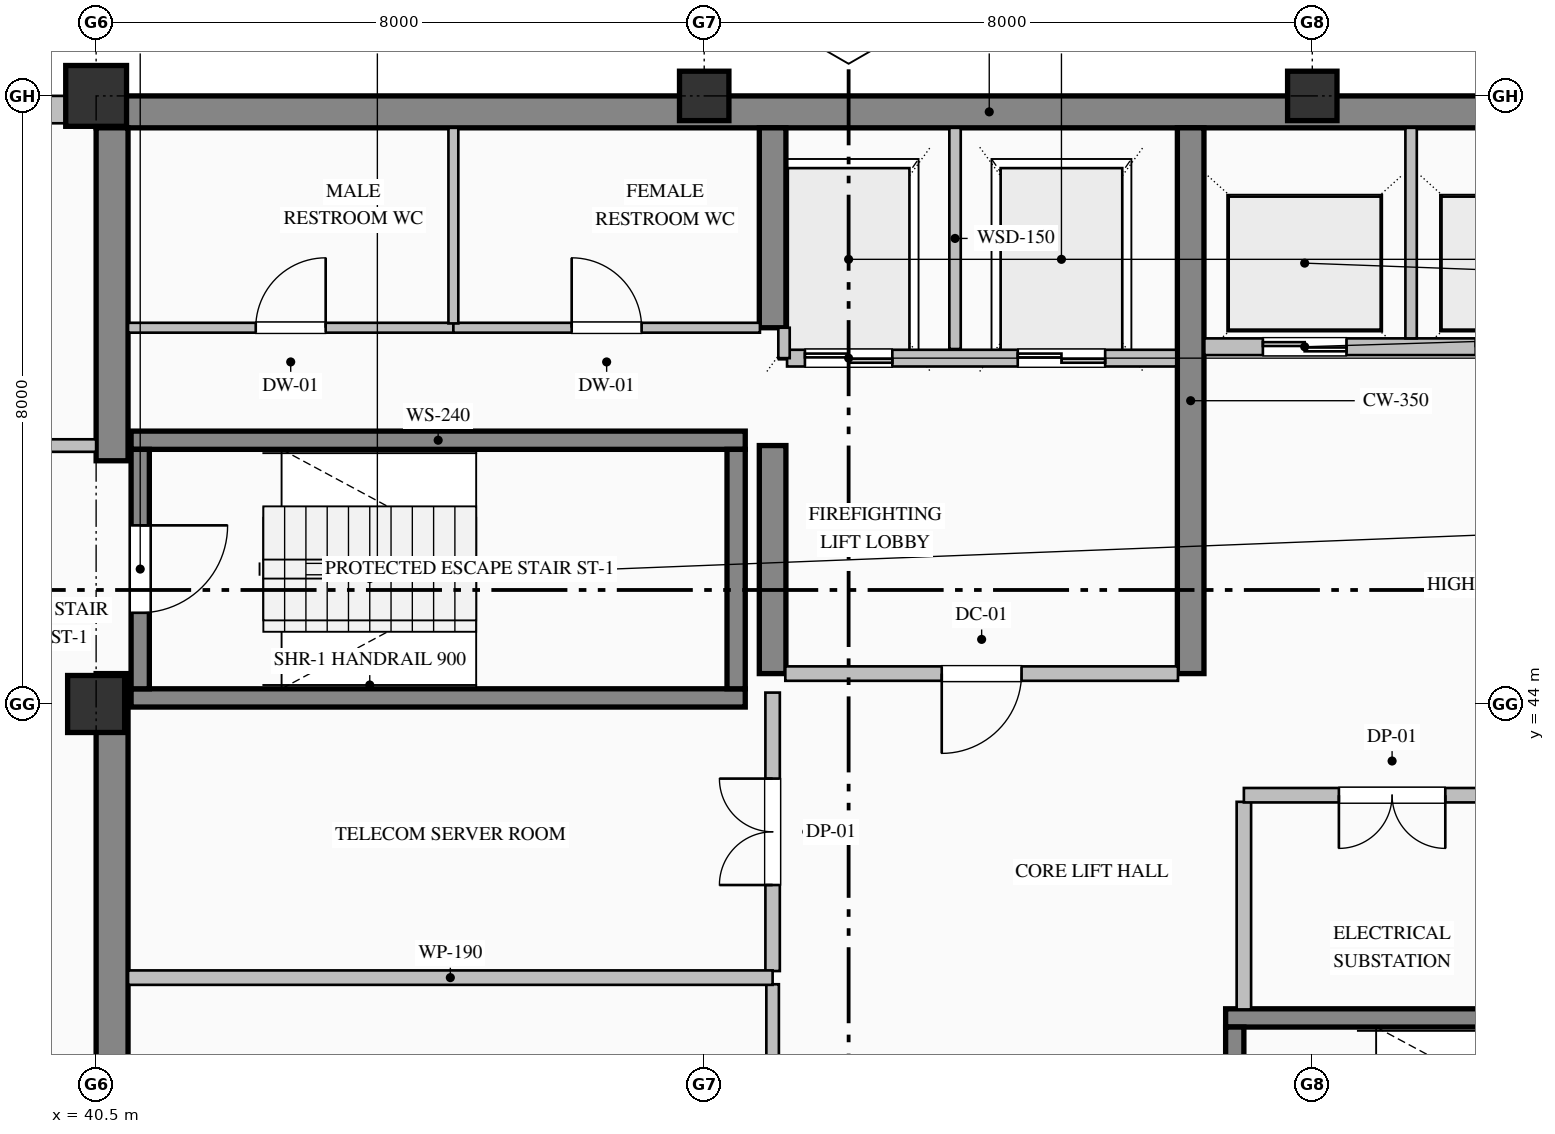
"""IFC4 building model, lengths in metres.
Left out: names, types, materials, properties, quantities, classifications, styles, units other than length and angle.
Written with IfcOpenShell. Run it as: python <this file> out.ifc"""

import sys

from ifc_helpers import new_model, si_unit, direction, frame, frame_2d, origin, origin_2d, place, context, subcontext, project, spatial, rectangle, hollow_rectangle, extrude, element, fill, save


model = new_model("IFC4")
c1 = context("Model", 3, precision=1e-05, world=origin(), true_north=direction((0.0, 1.0)))
c2 = subcontext(c1, "Body", "Model", "MODEL_VIEW")
j1 = project(units=[si_unit("LENGTHUNIT", "METRE"), si_unit("PLANEANGLEUNIT", "RADIAN")], contexts=[c1])
p1 = place(None, origin())
s1 = spatial("IfcSite", under=j1, at=p1, CompositionType="ELEMENT")
p2 = place(p1, origin())
s2 = spatial("IfcBuilding", under=s1, at=p2, CompositionType="ELEMENT")
p3 = place(p2, frame((0.0, 0.0, 299.2)))
s3 = spatial("IfcBuildingStorey", under=s2, at=p3, CompositionType="ELEMENT", Elevation=299.2)
p4 = place(p3, frame((40.5, 51.79, 0.0), z_axis=(0.0, 0.0, 1.0), x_axis=(1.0, 0.0, 0.0)))
e1 = element("IfcWall", 1, at=p4, inside=s3, PredefinedType="SHEAR", context=c2, shape_type="SweptSolid", body=[
    extrude(rectangle(XDim=23.5, YDim=0.42, at=frame_2d((11.75, 0.0))), origin(), (0.0, 0.0, 1.0), 3.785),
])
p5 = place(p3, frame((40.71, 36.42, 0.0), z_axis=(0.0, 0.0, 1.0), x_axis=(0.0, 1.0, 0.0)))
e2 = element("IfcWall", 2, at=p5, inside=s3, PredefinedType="SHEAR", context=c2, shape_type="SweptSolid", body=[
    extrude(rectangle(XDim=7.98, YDim=0.42, at=frame_2d((3.99, 0.0))), origin(), (0.0, 0.0, 1.0), 3.785),
])
p6 = place(p3, frame((40.71, 47.2, 0.0), z_axis=(0.0, 0.0, 1.0), x_axis=(0.0, 1.0, 0.0)))
e3 = element("IfcWall", 3, at=p6, inside=s3, PredefinedType="SHEAR", context=c2, shape_type="SweptSolid", body=[
    extrude(rectangle(XDim=4.38, YDim=0.42, at=frame_2d((2.19, 0.0))), origin(), (0.0, 0.0, 1.0), 3.785),
])
p7 = place(p3, frame((49.4, 44.4, 0.0), z_axis=(0.0, 0.0, 1.0), x_axis=(0.0, 1.0, 0.0)))
e4 = element("IfcWall", 4, at=p7, inside=s3, PredefinedType="SHEAR", context=c2, shape_type="SweptSolid", body=[
    extrude(rectangle(XDim=3.0, YDim=0.35, at=frame_2d((1.5, 0.0))), origin(), (0.0, 0.0, 1.0), 3.785),
])
p8 = place(p3, frame((49.4, 48.95, 0.0), z_axis=(0.0, 0.0, 1.0), x_axis=(0.0, 1.0, 0.0)))
e5 = element("IfcWall", 5, at=p8, inside=s3, PredefinedType="SHEAR", context=c2, shape_type="SweptSolid", body=[
    extrude(rectangle(XDim=2.63, YDim=0.35, at=frame_2d((1.315, 0.0))), origin(), (0.0, 0.0, 1.0), 3.785),
])
p9 = place(p3, frame((54.9, 44.4, 0.0), z_axis=(0.0, 0.0, 1.0), x_axis=(0.0, 1.0, 0.0)))
e6 = element("IfcWall", 6, at=p9, inside=s3, PredefinedType="SHEAR", context=c2, shape_type="SweptSolid", body=[
    extrude(rectangle(XDim=7.18, YDim=0.35, at=frame_2d((3.59, 0.0))), origin(), (0.0, 0.0, 1.0), 3.785),
])
p10 = place(p3, frame((40.5, 44.0, 0.0), z_axis=(0.0, 0.0, 1.0), x_axis=(1.0, 0.0, 0.0)))
e7 = element("IfcColumn", 7, at=p10, inside=s3, PredefinedType="COLUMN", context=c2, shape_type="SweptSolid", body=[
    extrude(rectangle(XDim=0.75, YDim=0.75, at=origin_2d()), origin(), (0.0, 0.0, 1.0), 4.0),
])
p11 = place(p3, frame((40.5, 52.0, 0.0), z_axis=(0.0, 0.0, 1.0), x_axis=(1.0, 0.0, 0.0)))
e8 = element("IfcColumn", 8, at=p11, inside=s3, PredefinedType="COLUMN", context=c2, shape_type="SweptSolid", body=[
    extrude(hollow_rectangle(XDim=0.8, YDim=0.8, WallThickness=0.032, at=origin_2d()), origin(), (0.0, 0.0, 1.0), 4.0),
])
for number, where, z_axis, x_axis in (
    (9, (48.5, 52.0, 0.0), (0.0, 0.0, 1.0), (1.0, 0.0, 0.0)),
    (10, (56.5, 52.0, 0.0), (0.0, 0.0, 1.0), (1.0, 0.0, 0.0)),
):
    element("IfcColumn", number, at=place(p3, frame(where, z_axis=z_axis, x_axis=x_axis)), inside=s3, PredefinedType="COLUMN", context=c2, shape_type="SweptSolid", body=[
        extrude(hollow_rectangle(XDim=0.65, YDim=0.65, WallThickness=0.028, at=origin_2d()), origin(), (0.0, 0.0, 1.0), 4.0),
    ])
p12 = place(p3, frame((20.5, 51.82, 0.0), z_axis=(0.0, 0.0, 1.0), x_axis=(1.0, 0.0, 0.0)))
e11 = element("IfcWall", 11, at=p12, inside=s3, PredefinedType="SOLIDWALL", context=c2, shape_type="SweptSolid", body=[
    extrude(rectangle(XDim=20.02, YDim=0.36, at=frame_2d((10.01, 0.0))), origin(), (0.0, 0.0, 1.0), 3.335),
])
p13 = place(p12, frame((6.725, 0.0, 0.9)))
e12 = element("IfcOpeningElement", 12, at=p13, cuts=e11, PredefinedType="OPENING", context=c2, shape_type="SweptSolid", body=[
    extrude(rectangle(XDim=0.95, YDim=1.85, at=frame_2d((0.475, 0.925))), frame((0.0, 0.19, 0.0), z_axis=(0.0, -1.0, 0.0), x_axis=(1.0, 0.0, 0.0)), (0.0, 0.0, 1.0), 0.38),
])
for number, where, z_axis, x_axis in (
    (13, (40.96, 47.47, 0.0), (0.0, 0.0, 1.0), (1.0, 0.0, 0.0)),
    (14, (49.04, 44.08, 0.0), (0.0, 0.0, 1.0), (-1.0, 0.0, 0.0)),
):
    element("IfcWall", number, at=place(p3, frame(where, z_axis=z_axis, x_axis=x_axis)), inside=s3, PredefinedType="SOLIDWALL", context=c2, shape_type="SweptSolid", body=[
        extrude(rectangle(XDim=8.08, YDim=0.24, at=frame_2d((4.04, 0.0))), origin(), (0.0, 0.0, 1.0), 4.0),
    ])
p14 = place(p3, frame((41.08, 47.35, 0.0), z_axis=(0.0, 0.0, 1.0), x_axis=(0.0, -1.0, 0.0)))
e15 = element("IfcWall", 15, at=p14, inside=s3, PredefinedType="SOLIDWALL", context=c2, shape_type="SweptSolid", body=[
    extrude(rectangle(XDim=3.15, YDim=0.24, at=frame_2d((1.575, 0.0))), origin(), (0.0, 0.0, 1.0), 4.0),
])
p15 = place(p14, frame((1.0, 0.0, 0.0)))
e16 = element("IfcOpeningElement", 16, at=p15, cuts=e15, PredefinedType="OPENING", context=c2, shape_type="SweptSolid", body=[
    extrude(rectangle(XDim=1.15, YDim=2.2, at=frame_2d((0.575, 1.1))), frame((0.0, 0.13, 0.0), z_axis=(0.0, -1.0, 0.0), x_axis=(1.0, 0.0, 0.0)), (0.0, 0.0, 1.0), 0.26),
])
p16 = place(p3, frame((48.92, 44.2, 0.0), z_axis=(0.0, 0.0, 1.0), x_axis=(0.0, 1.0, 0.0)))
e17 = element("IfcWall", 17, at=p16, inside=s3, PredefinedType="SOLIDWALL", context=c2, shape_type="SweptSolid", body=[
    extrude(rectangle(XDim=3.15, YDim=0.24, at=frame_2d((1.575, 0.0))), origin(), (0.0, 0.0, 1.0), 4.0),
])
p17 = place(p3, frame((55.36, 39.87, 0.0), z_axis=(0.0, 0.0, 1.0), x_axis=(1.0, 0.0, 0.0)))
e18 = element("IfcWall", 18, at=p17, inside=s3, PredefinedType="SOLIDWALL", context=c2, shape_type="SweptSolid", body=[
    extrude(rectangle(XDim=8.08, YDim=0.24, at=frame_2d((4.04, 0.0))), origin(), (0.0, 0.0, 1.0), 4.0),
])
p18 = place(p3, frame((55.48, 39.75, 0.0), z_axis=(0.0, 0.0, 1.0), x_axis=(0.0, -1.0, 0.0)))
e19 = element("IfcWall", 19, at=p18, inside=s3, PredefinedType="SOLIDWALL", context=c2, shape_type="SweptSolid", body=[
    extrude(rectangle(XDim=3.15, YDim=0.24, at=frame_2d((1.575, 0.0))), origin(), (0.0, 0.0, 1.0), 4.0),
])
p19 = place(p18, frame((1.0, 0.0, 0.0)))
e20 = element("IfcOpeningElement", 20, at=p19, cuts=e19, PredefinedType="OPENING", context=c2, shape_type="SweptSolid", body=[
    extrude(rectangle(XDim=1.15, YDim=2.2, at=frame_2d((0.575, 1.1))), frame((0.0, 0.13, 0.0), z_axis=(0.0, -1.0, 0.0), x_axis=(1.0, 0.0, 0.0)), (0.0, 0.0, 1.0), 0.26),
])
p20 = place(p3, frame((54.71, 48.55, 0.0), z_axis=(0.0, 0.0, 1.0), x_axis=(-1.0, 0.0, 0.0)))
e21 = element("IfcWall", 21, at=p20, inside=s3, PredefinedType="PARTITIONING", context=c2, shape_type="SweptSolid", body=[
    extrude(rectangle(XDim=5.12, YDim=0.22, at=frame_2d((2.56, 0.0))), origin(), (0.0, 0.0, 1.0), 3.785),
])
p21 = place(p20, frame((3.735, 0.0, 0.0)))
e22 = element("IfcOpeningElement", 22, at=p21, cuts=e21, PredefinedType="OPENING", context=c2, shape_type="SweptSolid", body=[
    extrude(rectangle(XDim=1.15, YDim=2.2, at=frame_2d((0.575, 1.1))), frame((0.0, 0.12, 0.0), z_axis=(0.0, -1.0, 0.0), x_axis=(1.0, 0.0, 0.0)), (0.0, 0.0, 1.0), 0.24),
])
p22 = place(p20, frame((0.935, 0.0, 0.0)))
e23 = element("IfcOpeningElement", 23, at=p22, cuts=e21, PredefinedType="OPENING", context=c2, shape_type="SweptSolid", body=[
    extrude(rectangle(XDim=1.15, YDim=2.2, at=frame_2d((0.575, 1.1))), frame((0.0, 0.12, 0.0), z_axis=(0.0, -1.0, 0.0), x_axis=(1.0, 0.0, 0.0)), (0.0, 0.0, 1.0), 0.24),
])
p23 = place(p3, frame((51.8, 48.67, 0.0), z_axis=(0.0, 0.0, 1.0), x_axis=(0.0, 1.0, 0.0)))
e24 = element("IfcWall", 24, at=p23, inside=s3, PredefinedType="PARTITIONING", context=c2, shape_type="SweptSolid", body=[
    extrude(rectangle(XDim=2.91, YDim=0.15, at=frame_2d((1.455, 0.0))), origin(), (0.0, 0.0, 1.0), 3.785),
])
p24 = place(p3, frame((49.55, 48.55, 0.0), z_axis=(0.0, 0.0, 1.0), x_axis=(0.0, 1.0, 0.0)))
e25 = element("IfcWall", 25, at=p24, inside=s3, PredefinedType="PARTITIONING", context=c2, shape_type="SweptSolid", body=[
    extrude(rectangle(XDim=0.4, YDim=0.15, at=frame_2d((0.2, 0.0))), origin(), (0.0, 0.0, 1.0), 3.785),
])
p25 = place(p3, frame((63.32, 48.7, 0.0), z_axis=(0.0, 0.0, 1.0), x_axis=(-1.0, 0.0, 0.0)))
e26 = element("IfcWall", 26, at=p25, inside=s3, PredefinedType="PARTITIONING", context=c2, shape_type="SweptSolid", body=[
    extrude(rectangle(XDim=8.24, YDim=0.22, at=frame_2d((4.12, 0.0))), origin(), (0.0, 0.0, 1.0), 3.785),
])
p26 = place(p25, frame((6.37, 0.0, 0.0)))
e27 = element("IfcOpeningElement", 27, at=p26, cuts=e26, PredefinedType="OPENING", context=c2, shape_type="SweptSolid", body=[
    extrude(rectangle(XDim=1.1, YDim=2.2, at=frame_2d((0.55, 1.1))), frame((0.0, 0.12, 0.0), z_axis=(0.0, -1.0, 0.0), x_axis=(1.0, 0.0, 0.0)), (0.0, 0.0, 1.0), 0.24),
])
p27 = place(p25, frame((3.57, 0.0, 0.0)))
e28 = element("IfcOpeningElement", 28, at=p27, cuts=e26, PredefinedType="OPENING", context=c2, shape_type="SweptSolid", body=[
    extrude(rectangle(XDim=1.1, YDim=2.2, at=frame_2d((0.55, 1.1))), frame((0.0, 0.12, 0.0), z_axis=(0.0, -1.0, 0.0), x_axis=(1.0, 0.0, 0.0)), (0.0, 0.0, 1.0), 0.24),
])
p28 = place(p25, frame((0.77, 0.0, 0.0)))
e29 = element("IfcOpeningElement", 29, at=p28, cuts=e26, PredefinedType="OPENING", context=c2, shape_type="SweptSolid", body=[
    extrude(rectangle(XDim=1.1, YDim=2.2, at=frame_2d((0.55, 1.1))), frame((0.0, 0.12, 0.0), z_axis=(0.0, -1.0, 0.0), x_axis=(1.0, 0.0, 0.0)), (0.0, 0.0, 1.0), 0.24),
])
p29 = place(p3, frame((57.8, 48.81, 0.0), z_axis=(0.0, 0.0, 1.0), x_axis=(0.0, 1.0, 0.0)))
e30 = element("IfcWall", 30, at=p29, inside=s3, PredefinedType="PARTITIONING", context=c2, shape_type="SweptSolid", body=[
    extrude(rectangle(XDim=2.77, YDim=0.15, at=frame_2d((1.385, 0.0))), origin(), (0.0, 0.0, 1.0), 3.785),
])
p30 = place(p3, frame((37.8, 47.4, 0.0), z_axis=(0.0, 0.0, 1.0), x_axis=(1.0, 0.0, 0.0)))
e31 = element("IfcWall", 31, at=p30, inside=s3, PredefinedType="PARTITIONING", context=c2, shape_type="SweptSolid", body=[
    extrude(rectangle(XDim=2.7, YDim=0.165, at=frame_2d((1.35, 0.0))), origin(), (0.0, 0.0, 1.0), 3.785),
])
p31 = place(p30, frame((0.825, 0.0, 0.0)))
e32 = element("IfcOpeningElement", 32, at=p31, cuts=e31, PredefinedType="OPENING", context=c2, shape_type="SweptSolid", body=[
    extrude(rectangle(XDim=1.05, YDim=2.15, at=frame_2d((0.525, 1.075))), frame((0.0, 0.093, 0.0), z_axis=(0.0, -1.0, 0.0), x_axis=(1.0, 0.0, 0.0)), (0.0, 0.0, 1.0), 0.185),
])
p32 = place(p3, frame((40.92, 48.95, 0.0), z_axis=(0.0, 0.0, 1.0), x_axis=(1.0, 0.0, 0.0)))
e33 = element("IfcWall", 33, at=p32, inside=s3, PredefinedType="PARTITIONING", context=c2, shape_type="SweptSolid", body=[
    extrude(rectangle(XDim=4.28, YDim=0.13, at=frame_2d((2.14, 0.0))), origin(), (0.0, 0.0, 1.0), 3.785),
])
p33 = place(p32, frame((1.68, 0.0, 0.0)))
e34 = element("IfcOpeningElement", 34, at=p33, cuts=e33, PredefinedType="OPENING", context=c2, shape_type="SweptSolid", body=[
    extrude(rectangle(XDim=0.92, YDim=2.15, at=frame_2d((0.46, 1.075))), frame((0.0, 0.075, 0.0), z_axis=(0.0, -1.0, 0.0), x_axis=(1.0, 0.0, 0.0)), (0.0, 0.0, 1.0), 0.15),
])
p34 = place(p3, frame((45.2, 48.95, 0.0), z_axis=(0.0, 0.0, 1.0), x_axis=(1.0, 0.0, 0.0)))
e35 = element("IfcWall", 35, at=p34, inside=s3, PredefinedType="PARTITIONING", context=c2, shape_type="SweptSolid", body=[
    extrude(rectangle(XDim=4.033, YDim=0.13, at=frame_2d((2.017, 0.0))), origin(), (0.0, 0.0, 1.0), 3.785),
])
p35 = place(p34, frame((1.556, 0.0, 0.0)))
e36 = element("IfcOpeningElement", 36, at=p35, cuts=e35, PredefinedType="OPENING", context=c2, shape_type="SweptSolid", body=[
    extrude(rectangle(XDim=0.92, YDim=2.15, at=frame_2d((0.46, 1.075))), frame((0.0, 0.075, 0.0), z_axis=(0.0, -1.0, 0.0), x_axis=(1.0, 0.0, 0.0)), (0.0, 0.0, 1.0), 0.15),
])
p36 = place(p3, frame((54.733, 44.4, 0.0), z_axis=(0.0, 0.0, 1.0), x_axis=(-1.0, 0.0, 0.0)))
e37 = element("IfcWall", 37, at=p36, inside=s3, PredefinedType="PARTITIONING", context=c2, shape_type="SweptSolid", body=[
    extrude(rectangle(XDim=5.166, YDim=0.19, at=frame_2d((2.583, 0.0))), origin(), (0.0, 0.0, 1.0), 3.785),
])
p37 = place(p36, frame((2.058, 0.0, 0.0)))
e38 = element("IfcOpeningElement", 38, at=p37, cuts=e37, PredefinedType="OPENING", context=c2, shape_type="SweptSolid", body=[
    extrude(rectangle(XDim=1.05, YDim=2.15, at=frame_2d((0.525, 1.075))), frame((0.0, 0.105, 0.0), z_axis=(0.0, -1.0, 0.0), x_axis=(1.0, 0.0, 0.0)), (0.0, 0.0, 1.0), 0.21),
])
p38 = place(p3, frame((49.4, 36.42, 0.0), z_axis=(0.0, 0.0, 1.0), x_axis=(0.0, 1.0, 0.0)))
e39 = element("IfcWall", 39, at=p38, inside=s3, PredefinedType="PARTITIONING", context=c2, shape_type="SweptSolid", body=[
    extrude(rectangle(XDim=3.893, YDim=0.165, at=frame_2d((1.947, 0.0))), origin(), (0.0, 0.0, 1.0), 3.027),
])
p39 = place(p38, frame((1.497, 0.0, 0.0)))
e40 = element("IfcOpeningElement", 40, at=p39, cuts=e39, PredefinedType="OPENING", context=c2, shape_type="SweptSolid", body=[
    extrude(rectangle(XDim=0.9, YDim=2.15, at=frame_2d((0.45, 1.075))), frame((0.0, 0.093, 0.0), z_axis=(0.0, -1.0, 0.0), x_axis=(1.0, 0.0, 0.0)), (0.0, 0.0, 1.0), 0.185),
])
p40 = place(p3, frame((49.4, 40.487, 0.0), z_axis=(0.0, 0.0, 1.0), x_axis=(0.0, 1.0, 0.0)))
e41 = element("IfcWall", 41, at=p40, inside=s3, PredefinedType="PARTITIONING", context=c2, shape_type="SweptSolid", body=[
    extrude(rectangle(XDim=3.663, YDim=0.19, at=frame_2d((1.832, 0.0))), origin(), (0.0, 0.0, 1.0), 3.027),
])
p41 = place(p40, frame((1.132, 0.0, 0.0)))
e42 = element("IfcOpeningElement", 42, at=p41, cuts=e41, PredefinedType="OPENING", context=c2, shape_type="SweptSolid", body=[
    extrude(rectangle(XDim=1.4, YDim=2.25, at=frame_2d((0.7, 1.125))), frame((0.0, 0.105, 0.0), z_axis=(0.0, -1.0, 0.0), x_axis=(1.0, 0.0, 0.0)), (0.0, 0.0, 1.0), 0.21),
])
p42 = place(p3, frame((55.6, 42.713, 0.0), z_axis=(0.0, 0.0, 1.0), x_axis=(0.0, -1.0, 0.0)))
e43 = element("IfcWall", 43, at=p42, inside=s3, PredefinedType="PARTITIONING", context=c2, shape_type="SweptSolid", body=[
    extrude(rectangle(XDim=2.731, YDim=0.19, at=frame_2d((1.365, 0.0))), origin(), (0.0, 0.0, 1.0), 3.785),
])
p43 = place(p3, frame((40.92, 40.4, 0.0), z_axis=(0.0, 0.0, 1.0), x_axis=(1.0, 0.0, 0.0)))
e44 = element("IfcWall", 44, at=p43, inside=s3, PredefinedType="PARTITIONING", context=c2, shape_type="SweptSolid", body=[
    extrude(rectangle(XDim=8.48, YDim=0.19, at=frame_2d((4.24, 0.0))), origin(), (0.0, 0.0, 1.0), 3.785),
])
p44 = place(p3, frame((59.5, 42.8, 0.0), z_axis=(0.0, 0.0, 1.0), x_axis=(-1.0, 0.0, 0.0)))
e45 = element("IfcWall", 45, at=p44, inside=s3, PredefinedType="PARTITIONING", context=c2, shape_type="SweptSolid", body=[
    extrude(rectangle(XDim=3.9, YDim=0.19, at=frame_2d((1.95, 0.0))), origin(), (0.0, 0.0, 1.0), 3.785),
])
p45 = place(p44, frame((1.25, 0.0, 0.0)))
e46 = element("IfcOpeningElement", 46, at=p45, cuts=e45, PredefinedType="OPENING", context=c2, shape_type="SweptSolid", body=[
    extrude(rectangle(XDim=1.4, YDim=2.25, at=frame_2d((0.7, 1.125))), frame((0.0, 0.105, 0.0), z_axis=(0.0, -1.0, 0.0), x_axis=(1.0, 0.0, 0.0)), (0.0, 0.0, 1.0), 0.21),
])
p46 = place(p3, frame((45.2, 51.58, 0.0), z_axis=(0.0, 0.0, 1.0), x_axis=(0.0, -1.0, 0.0)))
e47 = element("IfcWall", 47, at=p46, inside=s3, PredefinedType="PARTITIONING", context=c2, shape_type="SweptSolid", body=[
    extrude(rectangle(XDim=2.573, YDim=0.13, at=frame_2d((1.287, 0.0))), origin(), (0.0, 0.0, 1.0), 3.785),
])
p47 = place(p15, origin())
e48 = element("IfcDoor", 48, at=p47, inside=s3, OperationType="SINGLE_SWING_LEFT", PredefinedType="DOOR", context=c2, shape_type="SweptSolid", body=[
    extrude(rectangle(XDim=1.15, YDim=2.2, at=frame_2d((0.575, 1.1))), frame((0.0, 0.025, 0.0), z_axis=(0.0, -1.0, 0.0), x_axis=(1.0, 0.0, 0.0)), (0.0, 0.0, 1.0), 0.05),
])
fill(e16, e48)
p48 = place(p21, origin())
e49 = element("IfcDoor", 49, at=p48, inside=s3, OperationType="DOUBLE_DOOR_SLIDING", PredefinedType="DOOR", context=c2, shape_type="SweptSolid", body=[
    extrude(rectangle(XDim=1.15, YDim=2.2, at=frame_2d((0.575, 1.1))), frame((0.0, 0.025, 0.0), z_axis=(0.0, -1.0, 0.0), x_axis=(1.0, 0.0, 0.0)), (0.0, 0.0, 1.0), 0.05),
])
fill(e22, e49)
p49 = place(p22, origin())
e50 = element("IfcDoor", 50, at=p49, inside=s3, OperationType="DOUBLE_DOOR_SLIDING", PredefinedType="DOOR", context=c2, shape_type="SweptSolid", body=[
    extrude(rectangle(XDim=1.15, YDim=2.2, at=frame_2d((0.575, 1.1))), frame((0.0, 0.025, 0.0), z_axis=(0.0, -1.0, 0.0), x_axis=(1.0, 0.0, 0.0)), (0.0, 0.0, 1.0), 0.05),
])
fill(e23, e50)
p50 = place(p26, origin())
e51 = element("IfcDoor", 51, at=p50, inside=s3, OperationType="DOUBLE_DOOR_SLIDING", PredefinedType="DOOR", context=c2, shape_type="SweptSolid", body=[
    extrude(rectangle(XDim=1.1, YDim=2.2, at=frame_2d((0.55, 1.1))), frame((0.0, 0.025, 0.0), z_axis=(0.0, -1.0, 0.0), x_axis=(1.0, 0.0, 0.0)), (0.0, 0.0, 1.0), 0.05),
])
fill(e27, e51)
p51 = place(p37, origin())
e52 = element("IfcDoor", 52, at=p51, inside=s3, OperationType="SINGLE_SWING_RIGHT", PredefinedType="DOOR", context=c2, shape_type="SweptSolid", body=[
    extrude(rectangle(XDim=1.05, YDim=2.15, at=frame_2d((0.525, 1.075))), frame((0.0, 0.025, 0.0), z_axis=(0.0, -1.0, 0.0), x_axis=(1.0, 0.0, 0.0)), (0.0, 0.0, 1.0), 0.05),
])
fill(e38, e52)
p52 = place(p41, origin())
e53 = element("IfcDoor", 53, at=p52, inside=s3, OperationType="DOUBLE_DOOR_SINGLE_SWING", PredefinedType="DOOR", context=c2, shape_type="SweptSolid", body=[
    extrude(rectangle(XDim=1.4, YDim=2.25, at=frame_2d((0.7, 1.125))), frame((0.0, 0.025, 0.0), z_axis=(0.0, -1.0, 0.0), x_axis=(1.0, 0.0, 0.0)), (0.0, 0.0, 1.0), 0.05),
])
fill(e42, e53)
p53 = place(p33, origin())
e54 = element("IfcDoor", 54, at=p53, inside=s3, OperationType="SINGLE_SWING_RIGHT", PredefinedType="DOOR", context=c2, shape_type="SweptSolid", body=[
    extrude(rectangle(XDim=0.92, YDim=2.15, at=frame_2d((0.46, 1.075))), frame((0.0, 0.025, 0.0), z_axis=(0.0, -1.0, 0.0), x_axis=(1.0, 0.0, 0.0)), (0.0, 0.0, 1.0), 0.05),
])
fill(e34, e54)
p54 = place(p35, origin())
e55 = element("IfcDoor", 55, at=p54, inside=s3, OperationType="SINGLE_SWING_LEFT", PredefinedType="DOOR", context=c2, shape_type="SweptSolid", body=[
    extrude(rectangle(XDim=0.92, YDim=2.15, at=frame_2d((0.46, 1.075))), frame((0.0, 0.025, 0.0), z_axis=(0.0, -1.0, 0.0), x_axis=(1.0, 0.0, 0.0)), (0.0, 0.0, 1.0), 0.05),
])
fill(e36, e55)
p55 = place(p45, origin())
e56 = element("IfcDoor", 56, at=p55, inside=s3, OperationType="DOUBLE_DOOR_SINGLE_SWING", PredefinedType="DOOR", context=c2, shape_type="SweptSolid", body=[
    extrude(rectangle(XDim=1.4, YDim=2.25, at=frame_2d((0.7, 1.125))), frame((0.0, 0.025, 0.0), z_axis=(0.0, -1.0, 0.0), x_axis=(1.0, 0.0, 0.0)), (0.0, 0.0, 1.0), 0.05),
])
fill(e46, e56)
save(model, sys.argv[1])
